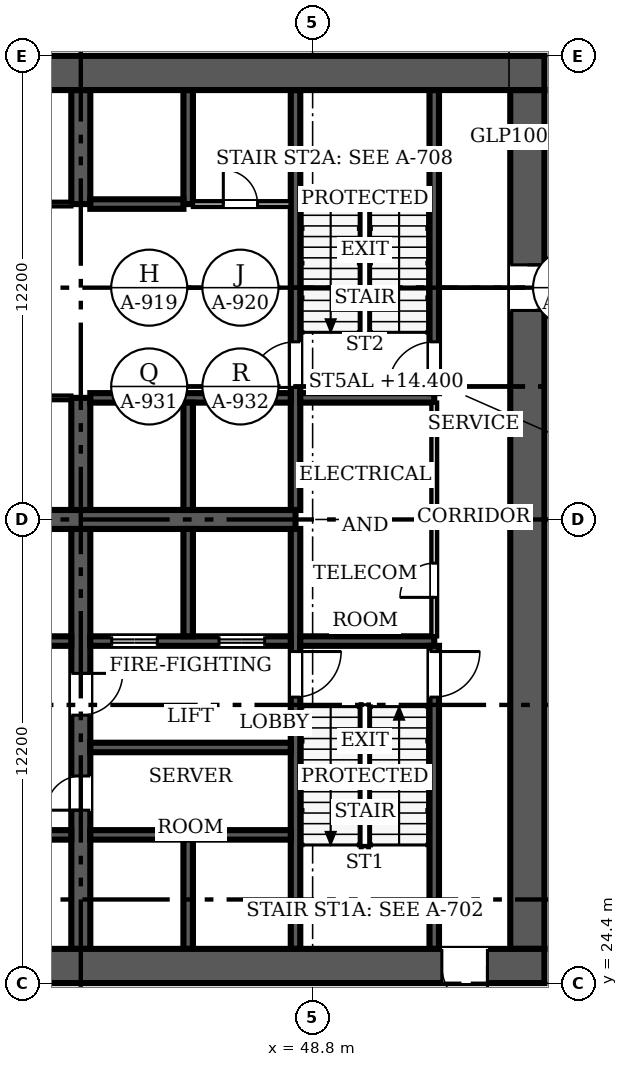
"""IFC4 building model, lengths in metres.
Left out: names, types, materials, properties, quantities, classifications, styles, units other than length and angle.
Written with IfcOpenShell. Run it as: python <this file> out.ifc"""

import sys

from ifc_helpers import new_model, si_unit, direction, frame, frame_2d, origin, place, context, subcontext, project, spatial, rectangle, extrude, source, transform, mapped, element, fill, save


model = new_model("IFC4")
c1 = context("Model", 3, precision=1e-05, world=origin(), true_north=direction((0.0, 1.0)))
c2 = subcontext(c1, "Body", "Model", "MODEL_VIEW")
j1 = project(units=[si_unit("LENGTHUNIT", "METRE"), si_unit("PLANEANGLEUNIT", "RADIAN")], contexts=[c1])
p1 = place(None, origin())
s1 = spatial("IfcSite", under=j1, at=p1, CompositionType="ELEMENT")
p2 = place(p1, origin())
s2 = spatial("IfcBuilding", under=s1, at=p2, CompositionType="ELEMENT")
p3 = place(p2, frame((0.0, 0.0, 12.0)))
s3 = spatial("IfcBuildingStorey", under=s2, at=p3, CompositionType="ELEMENT", Elevation=12.0)
p4 = place(p3, frame((54.9, 24.85, 0.0), z_axis=(0.0, 0.0, 1.0), x_axis=(-1.0, 0.0, 0.0)))
e1 = element("IfcWall", 1, at=p4, inside=s3, PredefinedType="SHEAR", context=c2, shape_type="SweptSolid", body=[
    extrude(rectangle(XDim=24.4, YDim=0.9, at=frame_2d((12.2, 0.0))), origin(), (0.0, 0.0, 1.0), 4.8),
])
m1 = source(origin(), c2, "Body", "SweptSolid", [
    extrude(rectangle(XDim=1.2, YDim=2.1, at=frame_2d((0.6, 1.05))), frame((0.0, 0.46, 0.0), z_axis=(0.0, -1.0, 0.0), x_axis=(1.0, 0.0, 0.0)), (0.0, 0.0, 1.0), 0.92),
])
p5 = place(p4, frame((1.5, 0.0, 0.0)))
e2 = element("IfcOpeningElement", 2, at=p5, cuts=e1, PredefinedType="OPENING", context=c2, shape_type="MappedRepresentation", body=[
    mapped(m1, transform((0.0, 0.0, 0.0), scale=1.0)),
])
p6 = place(p3, frame((30.5, 48.35, 0.0), z_axis=(0.0, 0.0, 1.0), x_axis=(1.0, 0.0, 0.0)))
e3 = element("IfcWall", 3, at=p6, inside=s3, PredefinedType="SHEAR", context=c2, shape_type="SweptSolid", body=[
    extrude(rectangle(XDim=24.4, YDim=0.9, at=frame_2d((12.2, 0.0))), origin(), (0.0, 0.0, 1.0), 4.8),
])
p7 = place(p3, frame((54.45, 47.9, 0.0), z_axis=(0.0, 0.0, 1.0), x_axis=(0.0, -1.0, 0.0)))
e4 = element("IfcWall", 4, at=p7, inside=s3, PredefinedType="SHEAR", context=c2, shape_type="SweptSolid", body=[
    extrude(rectangle(XDim=22.6, YDim=0.9, at=frame_2d((11.3, 0.0))), origin(), (0.0, 0.0, 1.0), 4.8),
])
p8 = place(p7, frame((4.6, 0.0, 0.0)))
e5 = element("IfcOpeningElement", 5, at=p8, cuts=e4, PredefinedType="OPENING", context=c2, shape_type="MappedRepresentation", body=[
    mapped(m1, transform((0.0, 0.0, 0.0), scale=1.0)),
])
p9 = place(p3, frame((31.4, 36.6, 0.0), z_axis=(0.0, 0.0, 1.0), x_axis=(1.0, 0.0, 0.0)))
e6 = element("IfcWall", 6, at=p9, inside=s3, PredefinedType="SHEAR", context=c2, shape_type="SweptSolid", body=[
    extrude(rectangle(XDim=16.95, YDim=0.5, at=frame_2d((8.475, 0.0))), origin(), (0.0, 0.0, 1.0), 4.8),
])
p10 = place(p3, frame((42.7, 36.35, 0.0), z_axis=(0.0, 0.0, 1.0), x_axis=(0.0, -1.0, 0.0)))
e7 = element("IfcWall", 7, at=p10, inside=s3, PredefinedType="SHEAR", context=c2, shape_type="SweptSolid", body=[
    extrude(rectangle(XDim=11.05, YDim=0.5, at=frame_2d((5.525, 0.0))), origin(), (0.0, 0.0, 1.0), 4.8),
])
m2 = source(origin(), c2, "Body", "SweptSolid", [
    extrude(rectangle(XDim=0.9, YDim=2.1, at=frame_2d((0.45, 1.05))), frame((0.0, 0.26, 0.0), z_axis=(0.0, -1.0, 0.0), x_axis=(1.0, 0.0, 0.0)), (0.0, 0.0, 1.0), 0.52),
])
p11 = place(p10, frame((6.5, 0.0, 0.0)))
e8 = element("IfcOpeningElement", 8, at=p11, cuts=e7, PredefinedType="OPENING", context=c2, shape_type="MappedRepresentation", body=[
    mapped(m2, transform((0.0, 0.0, 0.0), scale=1.0)),
])
m3 = source(origin(), c2, "Body", "SweptSolid", [
    extrude(rectangle(XDim=1.1, YDim=2.1, at=frame_2d((0.55, 1.05))), frame((0.0, 0.26, 0.0), z_axis=(0.0, -1.0, 0.0), x_axis=(1.0, 0.0, 0.0)), (0.0, 0.0, 1.0), 0.52),
])
p12 = place(p10, frame((3.8, 0.0, 0.0)))
e9 = element("IfcOpeningElement", 9, at=p12, cuts=e7, PredefinedType="OPENING", context=c2, shape_type="MappedRepresentation", body=[
    mapped(m3, transform((0.0, 0.0, 0.0), scale=1.0)),
])
p13 = place(p3, frame((42.7, 36.85, 0.0), z_axis=(0.0, 0.0, 1.0), x_axis=(0.0, 1.0, 0.0)))
e10 = element("IfcWall", 10, at=p13, inside=s3, PredefinedType="SHEAR", context=c2, shape_type="SweptSolid", body=[
    extrude(rectangle(XDim=2.95, YDim=0.5, at=frame_2d((1.475, 0.0))), origin(), (0.0, 0.0, 1.0), 4.8),
])
p14 = place(p3, frame((42.7, 44.9, 0.0), z_axis=(0.0, 0.0, 1.0), x_axis=(0.0, 1.0, 0.0)))
e11 = element("IfcWall", 11, at=p14, inside=s3, PredefinedType="SHEAR", context=c2, shape_type="SweptSolid", body=[
    extrude(rectangle(XDim=3.0, YDim=0.5, at=frame_2d((1.5, 0.0))), origin(), (0.0, 0.0, 1.0), 4.8),
])
p15 = place(p3, frame((48.35, 36.35, 0.0), z_axis=(0.0, 0.0, 1.0), x_axis=(0.0, -1.0, 0.0)))
e12 = element("IfcWall", 12, at=p15, inside=s3, PredefinedType="SOLIDWALL", context=c2, shape_type="SweptSolid", body=[
    extrude(rectangle(XDim=11.05, YDim=0.25, at=frame_2d((5.525, 0.0))), origin(), (0.0, 0.0, 1.0), 4.8),
])
m4 = source(origin(), c2, "Body", "SweptSolid", [
    extrude(rectangle(XDim=1.2, YDim=2.1, at=frame_2d((0.6, 1.05))), frame((0.0, 0.135, 0.0), z_axis=(0.0, -1.0, 0.0), x_axis=(1.0, 0.0, 0.0)), (0.0, 0.0, 1.0), 0.27),
])
p16 = place(p15, frame((3.225, 0.0, 0.0)))
e13 = element("IfcOpeningElement", 13, at=p16, cuts=e12, PredefinedType="OPENING", context=c2, shape_type="MappedRepresentation", body=[
    mapped(m4, transform((0.0, 0.0, 0.0), scale=1.0)),
])
p17 = place(p3, frame((48.35, 47.9, 0.0), z_axis=(0.0, 0.0, 1.0), x_axis=(0.0, -1.0, 0.0)))
e14 = element("IfcWall", 14, at=p17, inside=s3, PredefinedType="SOLIDWALL", context=c2, shape_type="SweptSolid", body=[
    extrude(rectangle(XDim=11.05, YDim=0.25, at=frame_2d((5.525, 0.0))), origin(), (0.0, 0.0, 1.0), 4.8),
])
p18 = place(p17, frame((6.625, 0.0, 0.0)))
e15 = element("IfcOpeningElement", 15, at=p18, cuts=e14, PredefinedType="OPENING", context=c2, shape_type="MappedRepresentation", body=[
    mapped(m4, transform((0.0, 0.0, 0.0), scale=1.0)),
])
p19 = place(p3, frame((42.45, 33.4, 0.0), z_axis=(0.0, 0.0, 1.0), x_axis=(-1.0, 0.0, 0.0)))
e16 = element("IfcWall", 16, at=p19, inside=s3, PredefinedType="SOLIDWALL", context=c2, shape_type="SweptSolid", body=[
    extrude(rectangle(XDim=11.05, YDim=0.25, at=frame_2d((5.525, 0.0))), origin(), (0.0, 0.0, 1.0), 4.8),
])
m5 = source(origin(), c2, "Body", "SweptSolid", [
    extrude(rectangle(XDim=1.1, YDim=2.1, at=frame_2d((0.55, 1.05))), frame((0.0, 0.135, 0.0), z_axis=(0.0, -1.0, 0.0), x_axis=(1.0, 0.0, 0.0)), (0.0, 0.0, 1.0), 0.27),
])
p20 = place(p19, frame((9.087, 0.0, 0.0)))
e17 = element("IfcOpeningElement", 17, at=p20, cuts=e16, PredefinedType="OPENING", context=c2, shape_type="MappedRepresentation", body=[
    mapped(m5, transform((0.0, 0.0, 0.0), scale=1.0)),
])
p21 = place(p19, frame((6.262, 0.0, 0.0)))
e18 = element("IfcOpeningElement", 18, at=p21, cuts=e16, PredefinedType="OPENING", context=c2, shape_type="MappedRepresentation", body=[
    mapped(m5, transform((0.0, 0.0, 0.0), scale=1.0)),
])
p22 = place(p19, frame((3.438, 0.0, 0.0)))
e19 = element("IfcOpeningElement", 19, at=p22, cuts=e16, PredefinedType="OPENING", context=c2, shape_type="MappedRepresentation", body=[
    mapped(m5, transform((0.0, 0.0, 0.0), scale=1.0)),
])
p23 = place(p19, frame((0.613, 0.0, 0.0)))
e20 = element("IfcOpeningElement", 20, at=p23, cuts=e16, PredefinedType="OPENING", context=c2, shape_type="MappedRepresentation", body=[
    mapped(m5, transform((0.0, 0.0, 0.0), scale=1.0)),
])
p24 = place(p3, frame((48.225, 33.4, 0.0), z_axis=(0.0, 0.0, 1.0), x_axis=(-1.0, 0.0, 0.0)))
e21 = element("IfcWall", 21, at=p24, inside=s3, PredefinedType="SOLIDWALL", context=c2, shape_type="SweptSolid", body=[
    extrude(rectangle(XDim=5.275, YDim=0.25, at=frame_2d((2.638, 0.0))), origin(), (0.0, 0.0, 1.0), 4.8),
])
p25 = place(p24, frame((3.512, 0.0, 0.0)))
e22 = element("IfcOpeningElement", 22, at=p25, cuts=e21, PredefinedType="OPENING", context=c2, shape_type="MappedRepresentation", body=[
    mapped(m4, transform((0.0, 0.0, 0.0), scale=1.0)),
])
p26 = place(p24, frame((0.688, 0.0, 0.0)))
e23 = element("IfcOpeningElement", 23, at=p26, cuts=e21, PredefinedType="OPENING", context=c2, shape_type="MappedRepresentation", body=[
    mapped(m4, transform((0.0, 0.0, 0.0), scale=1.0)),
])
p27 = place(p3, frame((48.475, 33.4, 0.0), z_axis=(0.0, 0.0, 1.0), x_axis=(1.0, 0.0, 0.0)))
e24 = element("IfcWall", 24, at=p27, inside=s3, PredefinedType="SOLIDWALL", context=c2, shape_type="SweptSolid", body=[
    extrude(rectangle(XDim=3.525, YDim=0.25, at=frame_2d((1.762, 0.0))), origin(), (0.0, 0.0, 1.0), 4.8),
])
p28 = place(p3, frame((31.4, 28.3, 0.0), z_axis=(0.0, 0.0, 1.0), x_axis=(1.0, 0.0, 0.0)))
e25 = element("IfcWall", 25, at=p28, inside=s3, PredefinedType="SOLIDWALL", context=c2, shape_type="SweptSolid", body=[
    extrude(rectangle(XDim=11.05, YDim=0.25, at=frame_2d((5.525, 0.0))), origin(), (0.0, 0.0, 1.0), 4.8),
])
p29 = place(p28, frame((0.863, 0.0, 0.0)))
e26 = element("IfcOpeningElement", 26, at=p29, cuts=e25, PredefinedType="OPENING", context=c2, shape_type="MappedRepresentation", body=[
    mapped(m5, transform((0.0, 0.0, 0.0), scale=1.0)),
])
p30 = place(p28, frame((3.688, 0.0, 0.0)))
e27 = element("IfcOpeningElement", 27, at=p30, cuts=e25, PredefinedType="OPENING", context=c2, shape_type="MappedRepresentation", body=[
    mapped(m5, transform((0.0, 0.0, 0.0), scale=1.0)),
])
p31 = place(p28, frame((6.512, 0.0, 0.0)))
e28 = element("IfcOpeningElement", 28, at=p31, cuts=e25, PredefinedType="OPENING", context=c2, shape_type="MappedRepresentation", body=[
    mapped(m5, transform((0.0, 0.0, 0.0), scale=1.0)),
])
p32 = place(p28, frame((9.337, 0.0, 0.0)))
e29 = element("IfcOpeningElement", 29, at=p32, cuts=e25, PredefinedType="OPENING", context=c2, shape_type="MappedRepresentation", body=[
    mapped(m5, transform((0.0, 0.0, 0.0), scale=1.0)),
])
for number, where, z_axis, x_axis in (
    (30, (42.95, 28.3, 0.0), (0.0, 0.0, 1.0), (1.0, 0.0, 0.0)),
    (31, (42.95, 39.8, 0.0), (0.0, 0.0, 1.0), (1.0, 0.0, 0.0)),
):
    element("IfcWall", number, at=place(p3, frame(where, z_axis=z_axis, x_axis=x_axis)), inside=s3, PredefinedType="SOLIDWALL", context=c2, shape_type="SweptSolid", body=[
        extrude(rectangle(XDim=5.275, YDim=0.25, at=frame_2d((2.638, 0.0))), origin(), (0.0, 0.0, 1.0), 4.8),
    ])
p33 = place(p3, frame((48.475, 39.8, 0.0), z_axis=(0.0, 0.0, 1.0), x_axis=(1.0, 0.0, 0.0)))
e32 = element("IfcWall", 32, at=p33, inside=s3, PredefinedType="SOLIDWALL", context=c2, shape_type="SweptSolid", body=[
    extrude(rectangle(XDim=3.525, YDim=0.25, at=frame_2d((1.762, 0.0))), origin(), (0.0, 0.0, 1.0), 4.8),
])
p34 = place(p3, frame((52.0, 25.3, 0.0), z_axis=(0.0, 0.0, 1.0), x_axis=(0.0, 1.0, 0.0)))
e33 = element("IfcWall", 33, at=p34, inside=s3, PredefinedType="SOLIDWALL", context=c2, shape_type="SweptSolid", body=[
    extrude(rectangle(XDim=7.975, YDim=0.25, at=frame_2d((3.987, 0.0))), origin(), (0.0, 0.0, 1.0), 4.8),
])
p35 = place(p34, frame((6.625, 0.0, 0.0)))
e34 = element("IfcOpeningElement", 34, at=p35, cuts=e33, PredefinedType="OPENING", context=c2, shape_type="MappedRepresentation", body=[
    mapped(m4, transform((0.0, 0.0, 0.0), scale=1.0)),
])
p36 = place(p3, frame((52.0, 39.925, 0.0), z_axis=(0.0, 0.0, 1.0), x_axis=(0.0, 1.0, 0.0)))
e35 = element("IfcWall", 35, at=p36, inside=s3, PredefinedType="SOLIDWALL", context=c2, shape_type="SweptSolid", body=[
    extrude(rectangle(XDim=7.975, YDim=0.25, at=frame_2d((3.987, 0.0))), origin(), (0.0, 0.0, 1.0), 4.8),
])
p37 = place(p36, frame((0.15, 0.0, 0.0)))
e36 = element("IfcOpeningElement", 36, at=p37, cuts=e35, PredefinedType="OPENING", context=c2, shape_type="MappedRepresentation", body=[
    mapped(m4, transform((0.0, 0.0, 0.0), scale=1.0)),
])
p38 = place(p3, frame((45.525, 33.525, 0.0), z_axis=(0.0, 0.0, 1.0), x_axis=(0.0, 1.0, 0.0)))
e37 = element("IfcWall", 37, at=p38, inside=s3, PredefinedType="SOLIDWALL", context=c2, shape_type="SweptSolid", body=[
    extrude(rectangle(XDim=2.825, YDim=0.25, at=frame_2d((1.413, 0.0))), origin(), (0.0, 0.0, 1.0), 4.8),
])
p39 = place(p3, frame((45.525, 36.85, 0.0), z_axis=(0.0, 0.0, 1.0), x_axis=(0.0, 1.0, 0.0)))
e38 = element("IfcWall", 38, at=p39, inside=s3, PredefinedType="SOLIDWALL", context=c2, shape_type="SweptSolid", body=[
    extrude(rectangle(XDim=2.825, YDim=0.25, at=frame_2d((1.413, 0.0))), origin(), (0.0, 0.0, 1.0), 4.8),
])
p40 = place(p3, frame((42.95, 30.6, 0.0), z_axis=(0.0, 0.0, 1.0), x_axis=(1.0, 0.0, 0.0)))
e39 = element("IfcWall", 39, at=p40, inside=s3, PredefinedType="SOLIDWALL", context=c2, shape_type="SweptSolid", body=[
    extrude(rectangle(XDim=5.275, YDim=0.25, at=frame_2d((2.638, 0.0))), origin(), (0.0, 0.0, 1.0), 4.8),
])
p41 = place(p3, frame((45.525, 25.3, 0.0), z_axis=(0.0, 0.0, 1.0), x_axis=(0.0, 1.0, 0.0)))
e40 = element("IfcWall", 40, at=p41, inside=s3, PredefinedType="SOLIDWALL", context=c2, shape_type="SweptSolid", body=[
    extrude(rectangle(XDim=2.875, YDim=0.25, at=frame_2d((1.438, 0.0))), origin(), (0.0, 0.0, 1.0), 4.8),
])
p42 = place(p3, frame((45.525, 44.9, 0.0), z_axis=(0.0, 0.0, 1.0), x_axis=(0.0, 1.0, 0.0)))
e41 = element("IfcWall", 41, at=p42, inside=s3, PredefinedType="SOLIDWALL", context=c2, shape_type="SweptSolid", body=[
    extrude(rectangle(XDim=3.0, YDim=0.25, at=frame_2d((1.5, 0.0))), origin(), (0.0, 0.0, 1.0), 4.8),
])
p43 = place(p3, frame((42.95, 44.9, 0.0), z_axis=(0.0, 0.0, 1.0), x_axis=(1.0, 0.0, 0.0)))
e42 = element("IfcWall", 42, at=p43, inside=s3, PredefinedType="SOLIDWALL", context=c2, shape_type="SweptSolid", body=[
    extrude(rectangle(XDim=2.45, YDim=0.25, at=frame_2d((1.225, 0.0))), origin(), (0.0, 0.0, 1.0), 4.8),
])
p44 = place(p3, frame((42.45, 39.8, 0.0), z_axis=(0.0, 0.0, 1.0), x_axis=(-1.0, 0.0, 0.0)))
e43 = element("IfcWall", 43, at=p44, inside=s3, PredefinedType="PARTITIONING", context=c2, shape_type="SweptSolid", body=[
    extrude(rectangle(XDim=11.05, YDim=0.12, at=frame_2d((5.525, 0.0))), origin(), (0.0, 0.0, 1.0), 4.6),
])
m6 = source(origin(), c2, "Body", "SweptSolid", [
    extrude(rectangle(XDim=0.9, YDim=2.1, at=frame_2d((0.45, 1.05))), frame((0.0, 0.07, 0.0), z_axis=(0.0, -1.0, 0.0), x_axis=(1.0, 0.0, 0.0)), (0.0, 0.0, 1.0), 0.14),
])
p45 = place(p44, frame((4.95, 0.0, 0.0)))
e44 = element("IfcOpeningElement", 44, at=p45, cuts=e43, PredefinedType="OPENING", context=c2, shape_type="MappedRepresentation", body=[
    mapped(m6, transform((0.0, 0.0, 0.0), scale=1.0)),
])
p46 = place(p3, frame((31.4, 44.9, 0.0), z_axis=(0.0, 0.0, 1.0), x_axis=(1.0, 0.0, 0.0)))
e45 = element("IfcWall", 45, at=p46, inside=s3, PredefinedType="PARTITIONING", context=c2, shape_type="SweptSolid", body=[
    extrude(rectangle(XDim=11.05, YDim=0.12, at=frame_2d((5.525, 0.0))), origin(), (0.0, 0.0, 1.0), 4.6),
])
p47 = place(p46, frame((2.375, 0.0, 0.0)))
e46 = element("IfcOpeningElement", 46, at=p47, cuts=e45, PredefinedType="OPENING", context=c2, shape_type="MappedRepresentation", body=[
    mapped(m6, transform((0.0, 0.0, 0.0), scale=1.0)),
])
p48 = place(p46, frame((8.025, 0.0, 0.0)))
e47 = element("IfcOpeningElement", 47, at=p48, cuts=e45, PredefinedType="OPENING", context=c2, shape_type="MappedRepresentation", body=[
    mapped(m6, transform((0.0, 0.0, 0.0), scale=1.0)),
])
p49 = place(p3, frame((52.0, 33.525, 0.0), z_axis=(0.0, 0.0, 1.0), x_axis=(0.0, 1.0, 0.0)))
e48 = element("IfcWall", 48, at=p49, inside=s3, PredefinedType="PARTITIONING", context=c2, shape_type="SweptSolid", body=[
    extrude(rectangle(XDim=6.15, YDim=0.15, at=frame_2d((3.075, 0.0))), origin(), (0.0, 0.0, 1.0), 4.6),
])
m7 = source(origin(), c2, "Body", "SweptSolid", [
    extrude(rectangle(XDim=0.9, YDim=2.1, at=frame_2d((0.45, 1.05))), frame((0.0, 0.085, 0.0), z_axis=(0.0, -1.0, 0.0), x_axis=(1.0, 0.0, 0.0)), (0.0, 0.0, 1.0), 0.17),
])
p50 = place(p49, frame((1.025, 0.0, 0.0)))
e49 = element("IfcOpeningElement", 49, at=p50, cuts=e48, PredefinedType="OPENING", context=c2, shape_type="MappedRepresentation", body=[
    mapped(m7, transform((0.0, 0.0, 0.0), scale=1.0)),
])
p51 = place(p3, frame((45.65, 44.9, 0.0), z_axis=(0.0, 0.0, 1.0), x_axis=(1.0, 0.0, 0.0)))
e50 = element("IfcWall", 50, at=p51, inside=s3, PredefinedType="PARTITIONING", context=c2, shape_type="SweptSolid", body=[
    extrude(rectangle(XDim=2.575, YDim=0.15, at=frame_2d((1.288, 0.0))), origin(), (0.0, 0.0, 1.0), 4.6),
])
p52 = place(p51, frame((0.8, 0.0, 0.0)))
e51 = element("IfcOpeningElement", 51, at=p52, cuts=e50, PredefinedType="OPENING", context=c2, shape_type="MappedRepresentation", body=[
    mapped(m7, transform((0.0, 0.0, 0.0), scale=1.0)),
])
m8 = source(origin(), c2, "Body", "SweptSolid", [
    extrude(rectangle(XDim=1.2, YDim=2.1, at=frame_2d((0.6, 1.05))), frame((0.0, 0.025, 0.0), z_axis=(0.0, -1.0, 0.0), x_axis=(1.0, 0.0, 0.0)), (0.0, 0.0, 1.0), 0.05),
])
p53 = place(p5, origin())
e52 = element("IfcDoor", 52, at=p53, inside=s3, OperationType="SINGLE_SWING_LEFT", PredefinedType="DOOR", context=c2, shape_type="MappedRepresentation", body=[
    mapped(m8, transform((0.0, 0.0, 0.0), scale=1.0)),
])
fill(e2, e52)
p54 = place(p8, origin())
e53 = element("IfcDoor", 53, at=p54, inside=s3, OperationType="SINGLE_SWING_LEFT", PredefinedType="DOOR", context=c2, shape_type="MappedRepresentation", body=[
    mapped(m8, transform((0.0, 0.0, 0.0), scale=1.0)),
])
fill(e5, e53)
m9 = source(origin(), c2, "Body", "SweptSolid", [
    extrude(rectangle(XDim=0.9, YDim=2.1, at=frame_2d((0.45, 1.05))), frame((0.0, 0.025, 0.0), z_axis=(0.0, -1.0, 0.0), x_axis=(1.0, 0.0, 0.0)), (0.0, 0.0, 1.0), 0.05),
])
p55 = place(p11, origin())
e54 = element("IfcDoor", 54, at=p55, inside=s3, OperationType="SINGLE_SWING_RIGHT", PredefinedType="DOOR", context=c2, shape_type="MappedRepresentation", body=[
    mapped(m9, transform((0.0, 0.0, 0.0), scale=1.0)),
])
fill(e8, e54)
m10 = source(origin(), c2, "Body", "SweptSolid", [
    extrude(rectangle(XDim=1.1, YDim=2.1, at=frame_2d((0.55, 1.05))), frame((0.0, 0.025, 0.0), z_axis=(0.0, -1.0, 0.0), x_axis=(1.0, 0.0, 0.0)), (0.0, 0.0, 1.0), 0.05),
])
p56 = place(p12, origin())
e55 = element("IfcDoor", 55, at=p56, inside=s3, OperationType="SINGLE_SWING_LEFT", PredefinedType="DOOR", context=c2, shape_type="MappedRepresentation", body=[
    mapped(m10, transform((0.0, 0.0, 0.0), scale=1.0)),
])
fill(e9, e55)
p57 = place(p16, origin())
e56 = element("IfcDoor", 56, at=p57, inside=s3, OperationType="SINGLE_SWING_LEFT", PredefinedType="DOOR", context=c2, shape_type="MappedRepresentation", body=[
    mapped(m8, transform((0.0, 0.0, 0.0), scale=1.0)),
])
fill(e13, e56)
p58 = place(p18, origin())
e57 = element("IfcDoor", 57, at=p58, inside=s3, OperationType="SINGLE_SWING_RIGHT", PredefinedType="DOOR", context=c2, shape_type="MappedRepresentation", body=[
    mapped(m8, transform((0.0, 0.0, 0.0), scale=1.0)),
])
fill(e15, e57)
p59 = place(p25, origin())
e58 = element("IfcDoor", 58, at=p59, inside=s3, OperationType="DOUBLE_DOOR_SLIDING", PredefinedType="DOOR", context=c2, shape_type="MappedRepresentation", body=[
    mapped(m8, transform((0.0, 0.0, 0.0), scale=1.0)),
])
fill(e22, e58)
p60 = place(p26, origin())
e59 = element("IfcDoor", 59, at=p60, inside=s3, OperationType="DOUBLE_DOOR_SLIDING", PredefinedType="DOOR", context=c2, shape_type="MappedRepresentation", body=[
    mapped(m8, transform((0.0, 0.0, 0.0), scale=1.0)),
])
fill(e23, e59)
p61 = place(p35, origin())
e60 = element("IfcDoor", 60, at=p61, inside=s3, OperationType="SINGLE_SWING_RIGHT", PredefinedType="DOOR", context=c2, shape_type="MappedRepresentation", body=[
    mapped(m8, transform((0.0, 0.0, 0.0), scale=1.0)),
])
fill(e34, e60)
p62 = place(p37, origin())
e61 = element("IfcDoor", 61, at=p62, inside=s3, OperationType="SINGLE_SWING_LEFT", PredefinedType="DOOR", context=c2, shape_type="MappedRepresentation", body=[
    mapped(m8, transform((0.0, 0.0, 0.0), scale=1.0)),
])
fill(e36, e61)
p63 = place(p50, origin())
e62 = element("IfcDoor", 62, at=p63, inside=s3, OperationType="SINGLE_SWING_LEFT", PredefinedType="DOOR", context=c2, shape_type="MappedRepresentation", body=[
    mapped(m9, transform((0.0, 0.0, 0.0), scale=1.0)),
])
fill(e49, e62)
p64 = place(p52, origin())
e63 = element("IfcDoor", 63, at=p64, inside=s3, OperationType="SINGLE_SWING_LEFT", PredefinedType="DOOR", context=c2, shape_type="MappedRepresentation", body=[
    mapped(m9, transform((0.0, 0.0, 0.0), scale=1.0)),
])
fill(e51, e63)
save(model, sys.argv[1])
